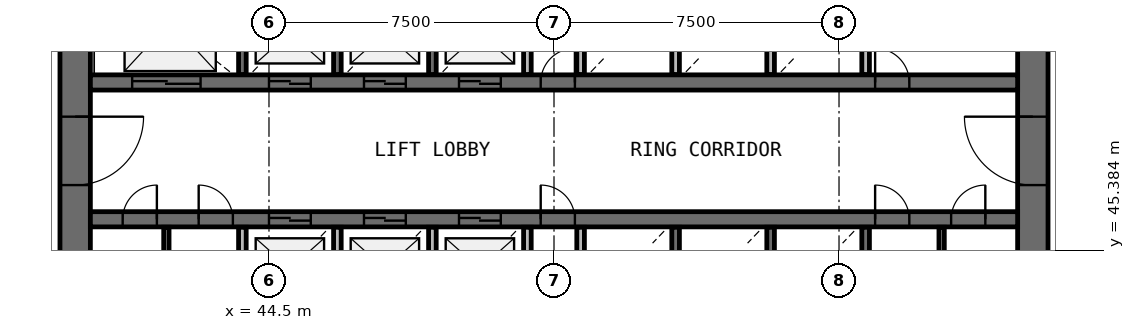
"""IFC4 building model, lengths in metres.
Left out: names, types, materials, properties, quantities, classifications, styles, units other than length and angle.
Written with IfcOpenShell. Run it as: python <this file> out.ifc"""

import sys

from ifc_helpers import new_model, si_unit, direction, frame, frame_2d, origin, place, context, subcontext, project, spatial, rectangle, extrude, source, transform, mapped, element, fill, save


model = new_model("IFC4")
c1 = context("Model", 3, precision=1e-05, world=origin(), true_north=direction((0.0, 1.0)))
c2 = subcontext(c1, "Body", "Model", "MODEL_VIEW")
j1 = project(units=[si_unit("LENGTHUNIT", "METRE"), si_unit("PLANEANGLEUNIT", "RADIAN")], contexts=[c1])
p1 = place(None, origin())
s1 = spatial("IfcSite", under=j1, at=p1, CompositionType="ELEMENT")
p2 = place(p1, origin())
s2 = spatial("IfcBuilding", under=s1, at=p2, CompositionType="ELEMENT")
p3 = place(p2, frame((0.0, 0.0, 83.9)))
s3 = spatial("IfcBuildingStorey", under=s2, at=p3, CompositionType="ELEMENT", Elevation=83.9)
p4 = place(p3, frame((64.6, 38.0, 0.0), z_axis=(0.0, 0.0, 1.0), x_axis=(0.0, 1.0, 0.0)))
e1 = element("IfcWall", 1, at=p4, inside=s3, PredefinedType="SHEAR", context=c2, shape_type="SweptSolid", body=[
    extrude(rectangle(XDim=20.0, YDim=0.8, at=frame_2d((10.0, 0.0))), origin(), (0.0, 0.0, 1.0), 4.1),
])
p5 = place(p4, frame((9.1, 0.0, 0.0)))
e2 = element("IfcOpeningElement", 2, at=p5, cuts=e1, PredefinedType="OPENING", context=c2, shape_type="SweptSolid", body=[
    extrude(rectangle(XDim=1.8, YDim=2.1, at=frame_2d((0.9, 1.05))), frame((0.0, 0.41, 0.0), z_axis=(0.0, -1.0, 0.0), x_axis=(1.0, 0.0, 0.0)), (0.0, 0.0, 1.0), 0.82),
])
p6 = place(p3, frame((39.4, 58.0, 0.0), z_axis=(0.0, 0.0, 1.0), x_axis=(0.0, -1.0, 0.0)))
e3 = element("IfcWall", 3, at=p6, inside=s3, PredefinedType="SHEAR", context=c2, shape_type="SweptSolid", body=[
    extrude(rectangle(XDim=20.0, YDim=0.8, at=frame_2d((10.0, 0.0))), origin(), (0.0, 0.0, 1.0), 4.1),
])
p7 = place(p6, frame((9.1, 0.0, 0.0)))
e4 = element("IfcOpeningElement", 4, at=p7, cuts=e3, PredefinedType="OPENING", context=c2, shape_type="SweptSolid", body=[
    extrude(rectangle(XDim=1.8, YDim=2.1, at=frame_2d((0.9, 1.05))), frame((0.0, 0.41, 0.0), z_axis=(0.0, -1.0, 0.0), x_axis=(1.0, 0.0, 0.0)), (0.0, 0.0, 1.0), 0.82),
])
p8 = place(p3, frame((39.8, 49.8, 0.0), z_axis=(0.0, 0.0, 1.0), x_axis=(1.0, 0.0, 0.0)))
e5 = element("IfcWall", 5, at=p8, inside=s3, PredefinedType="SHEAR", context=c2, shape_type="SweptSolid", body=[
    extrude(rectangle(XDim=24.4, YDim=0.4, at=frame_2d((12.2, 0.0))), origin(), (0.0, 0.0, 1.0), 4.1),
])
p9 = place(p8, frame((4.7, 0.0, 0.0)))
e6 = element("IfcOpeningElement", 6, at=p9, cuts=e5, PredefinedType="OPENING", context=c2, shape_type="SweptSolid", body=[
    extrude(rectangle(XDim=1.1, YDim=2.1, at=frame_2d((0.55, 1.05))), frame((0.0, 0.21, 0.0), z_axis=(0.0, -1.0, 0.0), x_axis=(1.0, 0.0, 0.0)), (0.0, 0.0, 1.0), 0.42),
])
p10 = place(p8, frame((7.2, 0.0, 0.0)))
e7 = element("IfcOpeningElement", 7, at=p10, cuts=e5, PredefinedType="OPENING", context=c2, shape_type="SweptSolid", body=[
    extrude(rectangle(XDim=1.1, YDim=2.1, at=frame_2d((0.55, 1.05))), frame((0.0, 0.21, 0.0), z_axis=(0.0, -1.0, 0.0), x_axis=(1.0, 0.0, 0.0)), (0.0, 0.0, 1.0), 0.42),
])
p11 = place(p8, frame((9.7, 0.0, 0.0)))
e8 = element("IfcOpeningElement", 8, at=p11, cuts=e5, PredefinedType="OPENING", context=c2, shape_type="SweptSolid", body=[
    extrude(rectangle(XDim=1.1, YDim=2.1, at=frame_2d((0.55, 1.05))), frame((0.0, 0.21, 0.0), z_axis=(0.0, -1.0, 0.0), x_axis=(1.0, 0.0, 0.0)), (0.0, 0.0, 1.0), 0.42),
])
p12 = place(p8, frame((1.1, 0.0, 0.0)))
e9 = element("IfcOpeningElement", 9, at=p12, cuts=e5, PredefinedType="OPENING", context=c2, shape_type="SweptSolid", body=[
    extrude(rectangle(XDim=1.8, YDim=2.4, at=frame_2d((0.9, 1.2))), frame((0.0, 0.21, 0.0), z_axis=(0.0, -1.0, 0.0), x_axis=(1.0, 0.0, 0.0)), (0.0, 0.0, 1.0), 0.42),
])
p13 = place(p8, frame((20.65, 0.0, 0.0)))
e10 = element("IfcOpeningElement", 10, at=p13, cuts=e5, PredefinedType="OPENING", context=c2, shape_type="SweptSolid", body=[
    extrude(rectangle(XDim=0.9, YDim=2.1, at=frame_2d((0.45, 1.05))), frame((0.0, 0.21, 0.0), z_axis=(0.0, -1.0, 0.0), x_axis=(1.0, 0.0, 0.0)), (0.0, 0.0, 1.0), 0.42),
])
p14 = place(p8, frame((11.85, 0.0, 0.0)))
e11 = element("IfcOpeningElement", 11, at=p14, cuts=e5, PredefinedType="OPENING", context=c2, shape_type="SweptSolid", body=[
    extrude(rectangle(XDim=0.9, YDim=2.1, at=frame_2d((0.45, 1.05))), frame((0.0, 0.21, 0.0), z_axis=(0.0, -1.0, 0.0), x_axis=(1.0, 0.0, 0.0)), (0.0, 0.0, 1.0), 0.42),
])
p15 = place(p3, frame((39.8, 46.2, 0.0), z_axis=(0.0, 0.0, 1.0), x_axis=(1.0, 0.0, 0.0)))
e12 = element("IfcWall", 12, at=p15, inside=s3, PredefinedType="SHEAR", context=c2, shape_type="SweptSolid", body=[
    extrude(rectangle(XDim=24.4, YDim=0.4, at=frame_2d((12.2, 0.0))), origin(), (0.0, 0.0, 1.0), 4.1),
])
p16 = place(p15, frame((4.7, 0.0, 0.0)))
e13 = element("IfcOpeningElement", 13, at=p16, cuts=e12, PredefinedType="OPENING", context=c2, shape_type="SweptSolid", body=[
    extrude(rectangle(XDim=1.1, YDim=2.1, at=frame_2d((0.55, 1.05))), frame((0.0, 0.21, 0.0), z_axis=(0.0, -1.0, 0.0), x_axis=(1.0, 0.0, 0.0)), (0.0, 0.0, 1.0), 0.42),
])
p17 = place(p15, frame((7.2, 0.0, 0.0)))
e14 = element("IfcOpeningElement", 14, at=p17, cuts=e12, PredefinedType="OPENING", context=c2, shape_type="SweptSolid", body=[
    extrude(rectangle(XDim=1.1, YDim=2.1, at=frame_2d((0.55, 1.05))), frame((0.0, 0.21, 0.0), z_axis=(0.0, -1.0, 0.0), x_axis=(1.0, 0.0, 0.0)), (0.0, 0.0, 1.0), 0.42),
])
p18 = place(p15, frame((9.7, 0.0, 0.0)))
e15 = element("IfcOpeningElement", 15, at=p18, cuts=e12, PredefinedType="OPENING", context=c2, shape_type="SweptSolid", body=[
    extrude(rectangle(XDim=1.1, YDim=2.1, at=frame_2d((0.55, 1.05))), frame((0.0, 0.21, 0.0), z_axis=(0.0, -1.0, 0.0), x_axis=(1.0, 0.0, 0.0)), (0.0, 0.0, 1.0), 0.42),
])
p19 = place(p15, frame((20.65, 0.0, 0.0)))
e16 = element("IfcOpeningElement", 16, at=p19, cuts=e12, PredefinedType="OPENING", context=c2, shape_type="SweptSolid", body=[
    extrude(rectangle(XDim=0.9, YDim=2.1, at=frame_2d((0.45, 1.05))), frame((0.0, 0.21, 0.0), z_axis=(0.0, -1.0, 0.0), x_axis=(1.0, 0.0, 0.0)), (0.0, 0.0, 1.0), 0.42),
])
p20 = place(p15, frame((22.65, 0.0, 0.0)))
e17 = element("IfcOpeningElement", 17, at=p20, cuts=e12, PredefinedType="OPENING", context=c2, shape_type="SweptSolid", body=[
    extrude(rectangle(XDim=0.9, YDim=2.1, at=frame_2d((0.45, 1.05))), frame((0.0, 0.21, 0.0), z_axis=(0.0, -1.0, 0.0), x_axis=(1.0, 0.0, 0.0)), (0.0, 0.0, 1.0), 0.42),
])
p21 = place(p15, frame((0.85, 0.0, 0.0)))
e18 = element("IfcOpeningElement", 18, at=p21, cuts=e12, PredefinedType="OPENING", context=c2, shape_type="SweptSolid", body=[
    extrude(rectangle(XDim=0.9, YDim=2.1, at=frame_2d((0.45, 1.05))), frame((0.0, 0.21, 0.0), z_axis=(0.0, -1.0, 0.0), x_axis=(1.0, 0.0, 0.0)), (0.0, 0.0, 1.0), 0.42),
])
p22 = place(p15, frame((2.85, 0.0, 0.0)))
e19 = element("IfcOpeningElement", 19, at=p22, cuts=e12, PredefinedType="OPENING", context=c2, shape_type="SweptSolid", body=[
    extrude(rectangle(XDim=0.9, YDim=2.1, at=frame_2d((0.45, 1.05))), frame((0.0, 0.21, 0.0), z_axis=(0.0, -1.0, 0.0), x_axis=(1.0, 0.0, 0.0)), (0.0, 0.0, 1.0), 0.42),
])
p23 = place(p15, frame((11.85, 0.0, 0.0)))
e20 = element("IfcOpeningElement", 20, at=p23, cuts=e12, PredefinedType="OPENING", context=c2, shape_type="SweptSolid", body=[
    extrude(rectangle(XDim=0.9, YDim=2.1, at=frame_2d((0.45, 1.05))), frame((0.0, 0.21, 0.0), z_axis=(0.0, -1.0, 0.0), x_axis=(1.0, 0.0, 0.0)), (0.0, 0.0, 1.0), 0.42),
])
for number, where, z_axis, x_axis in (
    (21, (43.8, 45.99, 0.0), (0.0, 0.0, 1.0), (0.0, -1.0, 0.0)),
    (22, (43.8, 52.37, 0.0), (0.0, 0.0, 1.0), (0.0, -1.0, 0.0)),
):
    element("IfcWall", number, at=place(p3, frame(where, z_axis=z_axis, x_axis=x_axis)), inside=s3, PredefinedType="SOLIDWALL", context=c2, shape_type="SweptSolid", body=[
        extrude(rectangle(XDim=2.36, YDim=0.2, at=frame_2d((1.18, 0.0))), origin(), (0.0, 0.0, 1.0), 3.7),
    ])
p24 = place(p3, frame((46.3, 43.6, 0.0), z_axis=(0.0, 0.0, 1.0), x_axis=(0.0, 1.0, 0.0)))
e23 = element("IfcWall", 23, at=p24, inside=s3, PredefinedType="SOLIDWALL", context=c2, shape_type="SweptSolid", body=[
    extrude(rectangle(XDim=2.39, YDim=0.2, at=frame_2d((1.195, 0.0))), origin(), (0.0, 0.0, 1.0), 3.7),
])
for number, where, z_axis, x_axis in (
    (24, (46.3, 50.01, 0.0), (0.0, 0.0, 1.0), (0.0, 1.0, 0.0)),
    (25, (48.8, 43.63, 0.0), (0.0, 0.0, 1.0), (0.0, 1.0, 0.0)),
    (26, (48.8, 50.01, 0.0), (0.0, 0.0, 1.0), (0.0, 1.0, 0.0)),
    (27, (51.3, 43.63, 0.0), (0.0, 0.0, 1.0), (0.0, 1.0, 0.0)),
):
    element("IfcWall", number, at=place(p3, frame(where, z_axis=z_axis, x_axis=x_axis)), inside=s3, PredefinedType="SOLIDWALL", context=c2, shape_type="SweptSolid", body=[
        extrude(rectangle(XDim=2.36, YDim=0.2, at=frame_2d((1.18, 0.0))), origin(), (0.0, 0.0, 1.0), 3.7),
    ])
for number, where, z_axis, x_axis in (
    (28, (51.3, 50.01, 0.0), (0.0, 0.0, 1.0), (0.0, 1.0, 0.0)),
    (29, (52.7, 45.99, 0.0), (0.0, 0.0, 1.0), (0.0, -1.0, 0.0)),
):
    element("IfcWall", number, at=place(p3, frame(where, z_axis=z_axis, x_axis=x_axis)), inside=s3, PredefinedType="SOLIDWALL", context=c2, shape_type="SweptSolid", body=[
        extrude(rectangle(XDim=2.39, YDim=0.2, at=frame_2d((1.195, 0.0))), origin(), (0.0, 0.0, 1.0), 3.7),
    ])
for number, where, z_axis, x_axis in (
    (30, (52.7, 52.37, 0.0), (0.0, 0.0, 1.0), (0.0, -1.0, 0.0)),
    (31, (55.2, 43.63, 0.0), (0.0, 0.0, 1.0), (0.0, 1.0, 0.0)),
    (32, (55.2, 50.01, 0.0), (0.0, 0.0, 1.0), (0.0, 1.0, 0.0)),
    (33, (57.7, 43.63, 0.0), (0.0, 0.0, 1.0), (0.0, 1.0, 0.0)),
):
    element("IfcWall", number, at=place(p3, frame(where, z_axis=z_axis, x_axis=x_axis)), inside=s3, PredefinedType="SOLIDWALL", context=c2, shape_type="SweptSolid", body=[
        extrude(rectangle(XDim=2.36, YDim=0.2, at=frame_2d((1.18, 0.0))), origin(), (0.0, 0.0, 1.0), 3.7),
    ])
p25 = place(p3, frame((57.7, 50.01, 0.0), z_axis=(0.0, 0.0, 1.0), x_axis=(0.0, 1.0, 0.0)))
e34 = element("IfcWall", 34, at=p25, inside=s3, PredefinedType="SOLIDWALL", context=c2, shape_type="SweptSolid", body=[
    extrude(rectangle(XDim=2.39, YDim=0.2, at=frame_2d((1.195, 0.0))), origin(), (0.0, 0.0, 1.0), 3.7),
])
for number, where, z_axis, x_axis in (
    (35, (60.2, 43.63, 0.0), (0.0, 0.0, 1.0), (0.0, 1.0, 0.0)),
    (36, (60.2, 50.01, 0.0), (0.0, 0.0, 1.0), (0.0, 1.0, 0.0)),
):
    element("IfcWall", number, at=place(p3, frame(where, z_axis=z_axis, x_axis=x_axis)), inside=s3, PredefinedType="SOLIDWALL", context=c2, shape_type="SweptSolid", body=[
        extrude(rectangle(XDim=2.36, YDim=0.2, at=frame_2d((1.18, 0.0))), origin(), (0.0, 0.0, 1.0), 3.7),
    ])
for number, where, z_axis, x_axis in (
    (37, (41.8, 43.6, 0.0), (0.0, 0.0, 1.0), (0.0, 1.0, 0.0)),
    (38, (62.2, 43.6, 0.0), (0.0, 0.0, 1.0), (0.0, 1.0, 0.0)),
):
    element("IfcWall", number, at=place(p3, frame(where, z_axis=z_axis, x_axis=x_axis)), inside=s3, PredefinedType="PARTITIONING", context=c2, shape_type="SweptSolid", body=[
        extrude(rectangle(XDim=2.39, YDim=0.14, at=frame_2d((1.195, 0.0))), origin(), (0.0, 0.0, 1.0), 2.9),
    ])
m1 = source(origin(), c2, "Body", "SweptSolid", [
    extrude(rectangle(XDim=1.8, YDim=2.1, at=frame_2d((0.9, 1.05))), frame((0.0, 0.025, 0.0), z_axis=(0.0, -1.0, 0.0), x_axis=(1.0, 0.0, 0.0)), (0.0, 0.0, 1.0), 0.05),
])
p26 = place(p7, origin())
e39 = element("IfcDoor", 39, at=p26, inside=s3, OperationType="SINGLE_SWING_LEFT", PredefinedType="DOOR", context=c2, shape_type="MappedRepresentation", body=[
    mapped(m1, transform((0.0, 0.0, 0.0), scale=1.0)),
])
fill(e4, e39)
p27 = place(p5, origin())
e40 = element("IfcDoor", 40, at=p27, inside=s3, OperationType="SINGLE_SWING_RIGHT", PredefinedType="DOOR", context=c2, shape_type="MappedRepresentation", body=[
    mapped(m1, transform((0.0, 0.0, 0.0), scale=1.0)),
])
fill(e2, e40)
m2 = source(origin(), c2, "Body", "SweptSolid", [
    extrude(rectangle(XDim=1.1, YDim=2.1, at=frame_2d((0.55, 1.05))), frame((0.0, 0.025, 0.0), z_axis=(0.0, -1.0, 0.0), x_axis=(1.0, 0.0, 0.0)), (0.0, 0.0, 1.0), 0.05),
])
p28 = place(p9, origin())
e41 = element("IfcDoor", 41, at=p28, inside=s3, OperationType="DOUBLE_DOOR_SLIDING", PredefinedType="USERDEFINED", context=c2, shape_type="MappedRepresentation", body=[
    mapped(m2, transform((0.0, 0.0, 0.0), scale=1.0)),
])
fill(e6, e41)
p29 = place(p10, origin())
e42 = element("IfcDoor", 42, at=p29, inside=s3, OperationType="DOUBLE_DOOR_SLIDING", PredefinedType="USERDEFINED", context=c2, shape_type="MappedRepresentation", body=[
    mapped(m2, transform((0.0, 0.0, 0.0), scale=1.0)),
])
fill(e7, e42)
p30 = place(p11, origin())
e43 = element("IfcDoor", 43, at=p30, inside=s3, OperationType="DOUBLE_DOOR_SLIDING", PredefinedType="USERDEFINED", context=c2, shape_type="MappedRepresentation", body=[
    mapped(m2, transform((0.0, 0.0, 0.0), scale=1.0)),
])
fill(e8, e43)
p31 = place(p16, origin())
e44 = element("IfcDoor", 44, at=p31, inside=s3, OperationType="DOUBLE_DOOR_SLIDING", PredefinedType="USERDEFINED", context=c2, shape_type="MappedRepresentation", body=[
    mapped(m2, transform((0.0, 0.0, 0.0), scale=1.0)),
])
fill(e13, e44)
p32 = place(p17, origin())
e45 = element("IfcDoor", 45, at=p32, inside=s3, OperationType="DOUBLE_DOOR_SLIDING", PredefinedType="USERDEFINED", context=c2, shape_type="MappedRepresentation", body=[
    mapped(m2, transform((0.0, 0.0, 0.0), scale=1.0)),
])
fill(e14, e45)
p33 = place(p18, origin())
e46 = element("IfcDoor", 46, at=p33, inside=s3, OperationType="DOUBLE_DOOR_SLIDING", PredefinedType="USERDEFINED", context=c2, shape_type="MappedRepresentation", body=[
    mapped(m2, transform((0.0, 0.0, 0.0), scale=1.0)),
])
fill(e15, e46)
m3 = source(origin(), c2, "Body", "SweptSolid", [
    extrude(rectangle(XDim=1.8, YDim=2.4, at=frame_2d((0.9, 1.2))), frame((0.0, 0.025, 0.0), z_axis=(0.0, -1.0, 0.0), x_axis=(1.0, 0.0, 0.0)), (0.0, 0.0, 1.0), 0.05),
])
p34 = place(p12, origin())
e47 = element("IfcDoor", 47, at=p34, inside=s3, OperationType="DOUBLE_DOOR_SLIDING", PredefinedType="USERDEFINED", context=c2, shape_type="MappedRepresentation", body=[
    mapped(m3, transform((0.0, 0.0, 0.0), scale=1.0)),
])
fill(e9, e47)
m4 = source(origin(), c2, "Body", "SweptSolid", [
    extrude(rectangle(XDim=0.9, YDim=2.1, at=frame_2d((0.45, 1.05))), frame((0.0, 0.025, 0.0), z_axis=(0.0, -1.0, 0.0), x_axis=(1.0, 0.0, 0.0)), (0.0, 0.0, 1.0), 0.05),
])
p35 = place(p19, origin())
e48 = element("IfcDoor", 48, at=p35, inside=s3, OperationType="SINGLE_SWING_LEFT", PredefinedType="DOOR", context=c2, shape_type="MappedRepresentation", body=[
    mapped(m4, transform((0.0, 0.0, 0.0), scale=1.0)),
])
fill(e16, e48)
p36 = place(p20, origin())
e49 = element("IfcDoor", 49, at=p36, inside=s3, OperationType="SINGLE_SWING_RIGHT", PredefinedType="DOOR", context=c2, shape_type="MappedRepresentation", body=[
    mapped(m4, transform((0.0, 0.0, 0.0), scale=1.0)),
])
fill(e17, e49)
p37 = place(p13, origin())
e50 = element("IfcDoor", 50, at=p37, inside=s3, OperationType="SINGLE_SWING_LEFT", PredefinedType="DOOR", context=c2, shape_type="MappedRepresentation", body=[
    mapped(m4, transform((0.0, 0.0, 0.0), scale=1.0)),
])
fill(e10, e50)
p38 = place(p21, origin())
e51 = element("IfcDoor", 51, at=p38, inside=s3, OperationType="SINGLE_SWING_RIGHT", PredefinedType="DOOR", context=c2, shape_type="MappedRepresentation", body=[
    mapped(m4, transform((0.0, 0.0, 0.0), scale=1.0)),
])
fill(e18, e51)
p39 = place(p22, origin())
e52 = element("IfcDoor", 52, at=p39, inside=s3, OperationType="SINGLE_SWING_LEFT", PredefinedType="DOOR", context=c2, shape_type="MappedRepresentation", body=[
    mapped(m4, transform((0.0, 0.0, 0.0), scale=1.0)),
])
fill(e19, e52)
p40 = place(p14, origin())
e53 = element("IfcDoor", 53, at=p40, inside=s3, OperationType="SINGLE_SWING_RIGHT", PredefinedType="DOOR", context=c2, shape_type="MappedRepresentation", body=[
    mapped(m4, transform((0.0, 0.0, 0.0), scale=1.0)),
])
fill(e11, e53)
p41 = place(p23, origin())
e54 = element("IfcDoor", 54, at=p41, inside=s3, OperationType="SINGLE_SWING_LEFT", PredefinedType="DOOR", context=c2, shape_type="MappedRepresentation", body=[
    mapped(m4, transform((0.0, 0.0, 0.0), scale=1.0)),
])
fill(e20, e54)
save(model, sys.argv[1])
